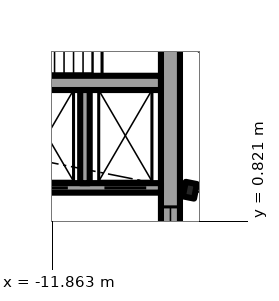
"""IFC4 building model, lengths in metres.
Left out: names, types, materials, properties, quantities, classifications, styles, units other than length and angle.
Written with IfcOpenShell. Run it as: python <this file> out.ifc"""

import sys

from ifc_helpers import new_model, si_unit, direction, frame, frame_2d, origin, origin_2d, place, context, subcontext, project, spatial, rectangle, i_section, extrude, element, fill, save


model = new_model("IFC4")
c1 = context("Model", 3, precision=1e-05, world=origin(), true_north=direction((0.0, 1.0)))
c2 = subcontext(c1, "Body", "Model", "MODEL_VIEW")
j1 = project(units=[si_unit("LENGTHUNIT", "METRE"), si_unit("PLANEANGLEUNIT", "RADIAN")], contexts=[c1])
p1 = place(None, origin())
s1 = spatial("IfcSite", under=j1, at=p1, CompositionType="ELEMENT")
p2 = place(p1, origin())
s2 = spatial("IfcBuilding", under=s1, at=p2, CompositionType="ELEMENT")
p3 = place(p2, frame((0.0, 0.0, 157.4)))
s3 = spatial("IfcBuildingStorey", under=s2, at=p3, CompositionType="ELEMENT", Elevation=157.4)
p4 = place(p3, frame((-8.239, 1.639, 0.0), z_axis=(0.0, 0.0, 1.0), x_axis=(-0.980785280403, 0.195090322016, 0.0)))
e1 = element("IfcColumn", 1, at=p4, inside=s3, PredefinedType="COLUMN", context=c2, shape_type="SweptSolid", body=[
    extrude(i_section(OverallWidth=0.3, OverallDepth=0.39, WebThickness=0.011, FlangeThickness=0.019, FilletRadius=0.027, at=origin_2d()), origin(), (0.0, 0.0, 1.0), 4.2),
])
p5 = place(p3, frame((-8.75, 8.6, 0.0), z_axis=(0.0, 0.0, 1.0), x_axis=(0.0, -1.0, 0.0)))
e2 = element("IfcWall", 2, at=p5, inside=s3, PredefinedType="SHEAR", context=c2, shape_type="SweptSolid", body=[
    extrude(rectangle(XDim=17.2, YDim=0.5, at=frame_2d((8.6, 0.0))), origin(), (0.0, 0.0, 1.0), 4.2),
])
p6 = place(p5, frame((7.4, 0.0, 0.1)))
e3 = element("IfcOpeningElement", 3, at=p6, cuts=e2, PredefinedType="OPENING", context=c2, shape_type="SweptSolid", body=[
    extrude(rectangle(XDim=2.4, YDim=2.2, at=frame_2d((1.2, 1.1))), frame((0.0, 0.26, 0.0), z_axis=(0.0, -1.0, 0.0), x_axis=(1.0, 0.0, 0.0)), (0.0, 0.0, 1.0), 0.52),
])
p7 = place(p3, frame((-9.0, 1.7, 0.0), z_axis=(0.0, 0.0, 1.0), x_axis=(-1.0, 0.0, 0.0)))
e4 = element("IfcWall", 4, at=p7, inside=s3, PredefinedType="SHEAR", context=c2, shape_type="SweptSolid", body=[
    extrude(rectangle(XDim=10.15, YDim=0.25, at=frame_2d((5.075, 0.0))), origin(), (0.0, 0.0, 1.0), 4.2),
])
p8 = place(p7, frame((0.387, 0.0, 0.0)))
e5 = element("IfcOpeningElement", 5, at=p8, cuts=e4, PredefinedType="OPENING", context=c2, shape_type="SweptSolid", body=[
    extrude(rectangle(XDim=1.1, YDim=2.3, at=frame_2d((0.55, 1.15))), frame((0.0, 0.135, 0.0), z_axis=(0.0, -1.0, 0.0), x_axis=(1.0, 0.0, 0.0)), (0.0, 0.0, 1.0), 0.27),
])
p9 = place(p7, frame((2.45, 0.0, 0.0)))
e6 = element("IfcOpeningElement", 6, at=p9, cuts=e4, PredefinedType="OPENING", context=c2, shape_type="SweptSolid", body=[
    extrude(rectangle(XDim=1.1, YDim=2.3, at=frame_2d((0.55, 1.15))), frame((0.0, 0.135, 0.0), z_axis=(0.0, -1.0, 0.0), x_axis=(1.0, 0.0, 0.0)), (0.0, 0.0, 1.0), 0.27),
])
p10 = place(p7, frame((4.45, 0.0, 0.0)))
e7 = element("IfcOpeningElement", 7, at=p10, cuts=e4, PredefinedType="OPENING", context=c2, shape_type="SweptSolid", body=[
    extrude(rectangle(XDim=1.1, YDim=2.3, at=frame_2d((0.55, 1.15))), frame((0.0, 0.135, 0.0), z_axis=(0.0, -1.0, 0.0), x_axis=(1.0, 0.0, 0.0)), (0.0, 0.0, 1.0), 0.27),
])
p11 = place(p7, frame((6.6, 0.0, 0.0)))
e8 = element("IfcOpeningElement", 8, at=p11, cuts=e4, PredefinedType="OPENING", context=c2, shape_type="SweptSolid", body=[
    extrude(rectangle(XDim=1.1, YDim=2.3, at=frame_2d((0.55, 1.15))), frame((0.0, 0.135, 0.0), z_axis=(0.0, -1.0, 0.0), x_axis=(1.0, 0.0, 0.0)), (0.0, 0.0, 1.0), 0.27),
])
p12 = place(p3, frame((-9.0, 4.462, 0.0), z_axis=(0.0, 0.0, 1.0), x_axis=(-1.0, 0.0, 0.0)))
e9 = element("IfcWall", 9, at=p12, inside=s3, PredefinedType="SHEAR", context=c2, shape_type="SweptSolid", body=[
    extrude(rectangle(XDim=10.15, YDim=0.375, at=frame_2d((5.075, 0.0))), origin(), (0.0, 0.0, 1.0), 4.2),
])
p13 = place(p3, frame((-11.0, 1.825, 0.0), z_axis=(0.0, 0.0, 1.0), x_axis=(0.0, 1.0, 0.0)))
e10 = element("IfcWall", 10, at=p13, inside=s3, PredefinedType="SOLIDWALL", context=c2, shape_type="SweptSolid", body=[
    extrude(rectangle(XDim=2.45, YDim=0.25, at=frame_2d((1.225, 0.0))), origin(), (0.0, 0.0, 1.0), 3.85),
])
p14 = place(p3, frame((-6.513, 4.472, 0.0), z_axis=(0.0, 0.0, 1.0), x_axis=(-0.83133816625, 0.555766905579, 0.0)))
e11 = element("IfcWall", 11, at=p14, inside=s3, PredefinedType="PARTITIONING", context=c2, shape_type="SweptSolid", body=[
    extrude(rectangle(XDim=2.323, YDim=0.2, at=frame_2d((1.162, 0.0))), origin(), (0.0, 0.0, 1.0), 3.85),
])
p15 = place(p8, origin())
e12 = element("IfcDoor", 12, at=p15, inside=s3, OperationType="DOUBLE_DOOR_SLIDING", PredefinedType="DOOR", context=c2, shape_type="SweptSolid", body=[
    extrude(rectangle(XDim=1.1, YDim=2.3, at=frame_2d((0.55, 1.15))), frame((0.0, 0.025, 0.0), z_axis=(0.0, -1.0, 0.0), x_axis=(1.0, 0.0, 0.0)), (0.0, 0.0, 1.0), 0.05),
])
fill(e5, e12)
p16 = place(p9, origin())
e13 = element("IfcDoor", 13, at=p16, inside=s3, OperationType="DOUBLE_DOOR_SLIDING", PredefinedType="DOOR", context=c2, shape_type="SweptSolid", body=[
    extrude(rectangle(XDim=1.1, YDim=2.3, at=frame_2d((0.55, 1.15))), frame((0.0, 0.025, 0.0), z_axis=(0.0, -1.0, 0.0), x_axis=(1.0, 0.0, 0.0)), (0.0, 0.0, 1.0), 0.05),
])
fill(e6, e13)
p17 = place(p6, origin())
e14 = element("IfcWindow", 14, at=p17, inside=s3, PartitioningType="SINGLE_PANEL", PredefinedType="WINDOW", context=c2, shape_type="SweptSolid", body=[
    extrude(rectangle(XDim=2.4, YDim=2.2, at=frame_2d((1.2, 1.1))), frame((0.0, 0.03, 0.0), z_axis=(0.0, -1.0, 0.0), x_axis=(1.0, 0.0, 0.0)), (0.0, 0.0, 1.0), 0.06),
])
fill(e3, e14)
save(model, sys.argv[1])
